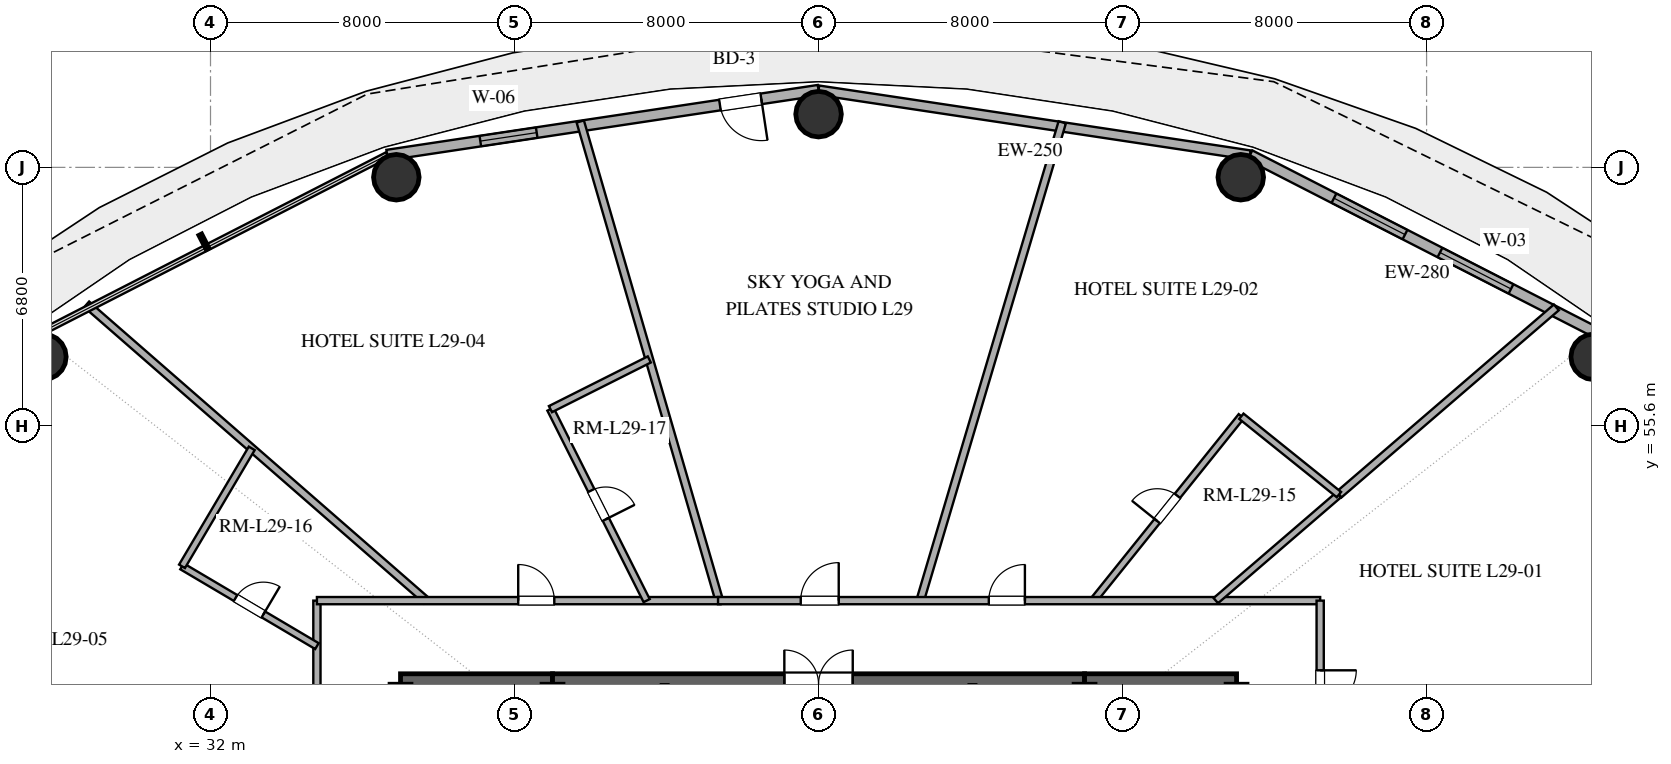
"""IFC4 building model, lengths in metres.
Left out: names, types, materials, properties, quantities, classifications, styles, units other than length and angle.
Written with IfcOpenShell. Run it as: python <this file> out.ifc"""

import sys

from ifc_helpers import new_model, si_unit, direction, frame, frame_2d, origin, origin_2d, place, context, subcontext, project, spatial, rectangle, hollow_circle, extrude, element, fill, save


model = new_model("IFC4")
c1 = context("Model", 3, precision=1e-05, world=origin(), true_north=direction((0.0, 1.0)))
c2 = subcontext(c1, "Body", "Model", "MODEL_VIEW")
j1 = project(units=[si_unit("LENGTHUNIT", "METRE"), si_unit("PLANEANGLEUNIT", "RADIAN")], contexts=[c1])
p1 = place(None, origin())
s1 = spatial("IfcSite", under=j1, at=p1, CompositionType="ELEMENT")
p2 = place(p1, origin())
s2 = spatial("IfcBuilding", under=s1, at=p2, CompositionType="ELEMENT")
p3 = place(p2, frame((0.0, 0.0, 116.4)))
s3 = spatial("IfcBuildingStorey", under=s2, at=p3, CompositionType="ELEMENT", Elevation=116.4)
p4 = place(p3, frame((37.0, 48.8, 0.0), z_axis=(0.0, 0.0, 1.0), x_axis=(1.0, 0.0, 0.0)))
e1 = element("IfcWall", 1, at=p4, inside=s3, PredefinedType="SHEAR", context=c2, shape_type="SweptSolid", body=[
    extrude(rectangle(XDim=4.0, YDim=0.55, at=frame_2d((2.0, 0.0))), origin(), (0.0, 0.0, 1.0), 3.38),
])
p5 = place(p3, frame((41.0, 48.8, 0.0), z_axis=(0.0, 0.0, 1.0), x_axis=(1.0, 0.0, 0.0)))
e2 = element("IfcWall", 2, at=p5, inside=s3, PredefinedType="SHEAR", context=c2, shape_type="SweptSolid", body=[
    extrude(rectangle(XDim=14.0, YDim=0.55, at=frame_2d((7.0, 0.0))), origin(), (0.0, 0.0, 1.0), 3.38),
])
p6 = place(p5, frame((6.1, 0.0, 0.0)))
e3 = element("IfcOpeningElement", 3, at=p6, cuts=e2, PredefinedType="OPENING", context=c2, shape_type="SweptSolid", body=[
    extrude(rectangle(XDim=1.8, YDim=2.25, at=frame_2d((0.9, 1.125))), frame((0.0, 0.285, 0.0), z_axis=(0.0, -1.0, 0.0), x_axis=(1.0, 0.0, 0.0)), (0.0, 0.0, 1.0), 0.57),
])
p7 = place(p3, frame((55.0, 48.8, 0.0), z_axis=(0.0, 0.0, 1.0), x_axis=(1.0, 0.0, 0.0)))
e4 = element("IfcWall", 4, at=p7, inside=s3, PredefinedType="SHEAR", context=c2, shape_type="SweptSolid", body=[
    extrude(rectangle(XDim=4.0, YDim=0.55, at=frame_2d((2.0, 0.0))), origin(), (0.0, 0.0, 1.0), 3.38),
])
for number, where, z_axis, x_axis in (
    (5, (68.398, 57.415, 0.0), (0.0, 0.0, 1.0), (1.0, 0.0, 0.0)),
    (6, (59.11, 62.141, 0.0), (0.0, 0.0, 1.0), (1.0, 0.0, 0.0)),
    (7, (48.0, 63.8, 0.0), (0.0, 0.0, 1.0), (1.0, 0.0, 0.0)),
    (8, (36.89, 62.141, 0.0), (0.0, 0.0, 1.0), (1.0, 0.0, 0.0)),
    (9, (27.602, 57.415, 0.0), (0.0, 0.0, 1.0), (1.0, 0.0, 0.0)),
):
    element("IfcColumn", number, at=place(p3, frame(where, z_axis=z_axis, x_axis=x_axis)), inside=s3, PredefinedType="COLUMN", context=c2, shape_type="SweptSolid", body=[
        extrude(hollow_circle(Radius=0.6, WallThickness=0.032, at=origin_2d()), origin(), (0.0, 0.0, 1.0), 3.38),
    ])
p8 = place(p3, frame((68.84, 57.86, 0.0), z_axis=(0.0, 0.0, 1.0), x_axis=(-0.889959505023, 0.45603955905, 0.0)))
e10 = element("IfcWall", 10, at=p8, inside=s3, PredefinedType="SOLIDWALL", context=c2, shape_type="SweptSolid", body=[
    extrude(rectangle(XDim=10.662, YDim=0.28, at=frame_2d((5.331, 0.0))), origin(), (0.0, 0.0, 1.0), 3.38),
])
p9 = place(p8, frame((2.942, 0.0, 0.85)))
e11 = element("IfcOpeningElement", 11, at=p9, cuts=e10, PredefinedType="OPENING", context=c2, shape_type="SweptSolid", body=[
    extrude(rectangle(XDim=2.1, YDim=2.2, at=frame_2d((1.05, 1.1))), frame((0.0, 0.15, 0.0), z_axis=(0.0, -1.0, 0.0), x_axis=(1.0, 0.0, 0.0)), (0.0, 0.0, 1.0), 0.3),
])
p10 = place(p8, frame((6.077, 0.0, 0.85)))
e12 = element("IfcOpeningElement", 12, at=p10, cuts=e10, PredefinedType="OPENING", context=c2, shape_type="SweptSolid", body=[
    extrude(rectangle(XDim=2.1, YDim=2.2, at=frame_2d((1.05, 1.1))), frame((0.0, 0.15, 0.0), z_axis=(0.0, -1.0, 0.0), x_axis=(1.0, 0.0, 0.0)), (0.0, 0.0, 1.0), 0.3),
])
p11 = place(p3, frame((59.351, 62.723, 0.0), z_axis=(0.0, 0.0, 1.0), x_axis=(-0.988877774656, 0.148730450117, 0.0)))
e13 = element("IfcWall", 13, at=p11, inside=s3, PredefinedType="SOLIDWALL", context=c2, shape_type="SweptSolid", body=[
    extrude(rectangle(XDim=11.479, YDim=0.25, at=frame_2d((5.74, 0.0))), origin(), (0.0, 0.0, 1.0), 3.38),
])
p12 = place(p3, frame((48.0, 64.43, 0.0), z_axis=(0.0, 0.0, 1.0), x_axis=(-0.988877774656, -0.148730450117, 0.0)))
e14 = element("IfcWall", 14, at=p12, inside=s3, PredefinedType="SOLIDWALL", context=c2, shape_type="SweptSolid", body=[
    extrude(rectangle(XDim=11.479, YDim=0.28, at=frame_2d((5.74, 0.0))), origin(), (0.0, 0.0, 1.0), 3.38),
])
p13 = place(p12, frame((1.524, 0.0, 0.0)))
e15 = element("IfcOpeningElement", 15, at=p13, cuts=e14, PredefinedType="OPENING", context=c2, shape_type="SweptSolid", body=[
    extrude(rectangle(XDim=1.1, YDim=2.25, at=frame_2d((0.55, 1.125))), frame((0.0, 0.15, 0.0), z_axis=(0.0, -1.0, 0.0), x_axis=(1.0, 0.0, 0.0)), (0.0, 0.0, 1.0), 0.3),
])
p14 = place(p12, frame((7.5, 0.0, 0.85)))
e16 = element("IfcOpeningElement", 16, at=p14, cuts=e14, PredefinedType="OPENING", context=c2, shape_type="SweptSolid", body=[
    extrude(rectangle(XDim=1.5, YDim=2.0, at=frame_2d((0.75, 1.0))), frame((0.0, 0.15, 0.0), z_axis=(0.0, -1.0, 0.0), x_axis=(1.0, 0.0, 0.0)), (0.0, 0.0, 1.0), 0.3),
])
p15 = place(p3, frame((54.413, 63.586, 0.0), z_axis=(0.0, 0.0, 1.0), x_axis=(-0.284782789849, -0.958592073098, 0.0)))
e17 = element("IfcWall", 17, at=p15, inside=s3, PredefinedType="PARTITIONING", context=c2, shape_type="SweptSolid", body=[
    extrude(rectangle(XDim=13.129, YDim=0.2, at=frame_2d((6.565, 0.0))), origin(), (0.0, 0.0, 1.0), 2.74),
])
p16 = place(p3, frame((67.415, 58.716, 0.0), z_axis=(0.0, 0.0, 1.0), x_axis=(-0.757805222449, -0.652480838668, 0.0)))
e18 = element("IfcWall", 18, at=p16, inside=s3, PredefinedType="PARTITIONING", context=c2, shape_type="SweptSolid", body=[
    extrude(rectangle(XDim=7.55, YDim=0.2, at=frame_2d((3.775, 0.0))), origin(), (0.0, 0.0, 1.0), 2.74),
])
p17 = place(p3, frame((45.388, 51.0, 0.0), z_axis=(0.0, 0.0, 1.0), x_axis=(-0.278690680179, 0.960380916502, 0.0)))
e19 = element("IfcWall", 19, at=p17, inside=s3, PredefinedType="PARTITIONING", context=c2, shape_type="SweptSolid", body=[
    extrude(rectangle(XDim=13.127, YDim=0.2, at=frame_2d((6.563, 0.0))), origin(), (0.0, 0.0, 1.0), 2.74),
])
p18 = place(p3, frame((55.229, 51.0, 0.0), z_axis=(0.0, 0.0, 1.0), x_axis=(0.626239129839, 0.779631035977, 0.0)))
e20 = element("IfcWall", 20, at=p18, inside=s3, PredefinedType="PLUMBINGWALL", context=c2, shape_type="SweptSolid", body=[
    extrude(rectangle(XDim=6.223, YDim=0.18, at=frame_2d((3.112, 0.0))), origin(), (0.0, 0.0, 1.0), 2.74),
])
p19 = place(p18, frame((2.687, 0.0, 0.0)))
e21 = element("IfcOpeningElement", 21, at=p19, cuts=e20, PredefinedType="OPENING", context=c2, shape_type="SweptSolid", body=[
    extrude(rectangle(XDim=0.85, YDim=2.1, at=frame_2d((0.425, 1.05))), frame((0.0, 0.1, 0.0), z_axis=(0.0, -1.0, 0.0), x_axis=(1.0, 0.0, 0.0)), (0.0, 0.0, 1.0), 0.2),
])
p20 = place(p3, frame((37.68, 51.0, 0.0), z_axis=(0.0, 0.0, 1.0), x_axis=(-0.753659518717, 0.657265037749, 0.0)))
e22 = element("IfcWall", 22, at=p20, inside=s3, PredefinedType="PARTITIONING", context=c2, shape_type="SweptSolid", body=[
    extrude(rectangle(XDim=11.861, YDim=0.2, at=frame_2d((5.93, 0.0))), origin(), (0.0, 0.0, 1.0), 2.74),
])
p21 = place(p3, frame((34.8, 41.476, 0.0), z_axis=(0.0, 0.0, 1.0), x_axis=(0.0, 1.0, 0.0)))
e23 = element("IfcWall", 23, at=p21, inside=s3, PredefinedType="PARTITIONING", context=c2, shape_type="SweptSolid", body=[
    extrude(rectangle(XDim=9.524, YDim=0.19, at=frame_2d((4.762, 0.0))), origin(), (0.0, 0.0, 1.0), 2.74),
])
p22 = place(p21, frame((4.924, 0.0, 0.0)))
e24 = element("IfcOpeningElement", 24, at=p22, cuts=e23, PredefinedType="OPENING", context=c2, shape_type="SweptSolid", body=[
    extrude(rectangle(XDim=0.95, YDim=2.15, at=frame_2d((0.475, 1.075))), frame((0.0, 0.105, 0.0), z_axis=(0.0, -1.0, 0.0), x_axis=(1.0, 0.0, 0.0)), (0.0, 0.0, 1.0), 0.21),
])
p23 = place(p3, frame((34.8, 51.0, 0.0), z_axis=(0.0, 0.0, 1.0), x_axis=(1.0, 0.0, 0.0)))
e25 = element("IfcWall", 25, at=p23, inside=s3, PredefinedType="PARTITIONING", context=c2, shape_type="SweptSolid", body=[
    extrude(rectangle(XDim=10.622, YDim=0.19, at=frame_2d((5.311, 0.0))), origin(), (0.0, 0.0, 1.0), 2.74),
])
p24 = place(p23, frame((5.297, 0.0, 0.0)))
e26 = element("IfcOpeningElement", 26, at=p24, cuts=e25, PredefinedType="OPENING", context=c2, shape_type="SweptSolid", body=[
    extrude(rectangle(XDim=0.95, YDim=2.15, at=frame_2d((0.475, 1.075))), frame((0.0, 0.105, 0.0), z_axis=(0.0, -1.0, 0.0), x_axis=(1.0, 0.0, 0.0)), (0.0, 0.0, 1.0), 0.21),
])
p25 = place(p3, frame((40.945, 56.039, 0.0), z_axis=(0.0, 0.0, 1.0), x_axis=(0.44904833135, -0.893507468414, 0.0)))
e27 = element("IfcWall", 27, at=p25, inside=s3, PredefinedType="PLUMBINGWALL", context=c2, shape_type="SweptSolid", body=[
    extrude(rectangle(XDim=5.639, YDim=0.18, at=frame_2d((2.82, 0.0))), origin(), (0.0, 0.0, 1.0), 2.74),
])
p26 = place(p25, frame((2.395, 0.0, 0.0)))
e28 = element("IfcOpeningElement", 28, at=p26, cuts=e27, PredefinedType="OPENING", context=c2, shape_type="SweptSolid", body=[
    extrude(rectangle(XDim=0.85, YDim=2.1, at=frame_2d((0.425, 1.05))), frame((0.0, 0.1, 0.0), z_axis=(0.0, -1.0, 0.0), x_axis=(1.0, 0.0, 0.0)), (0.0, 0.0, 1.0), 0.2),
])
p27 = place(p3, frame((45.355, 51.0, 0.0), z_axis=(0.0, 0.0, 1.0), x_axis=(1.0, 0.0, 0.0)))
e29 = element("IfcWall", 29, at=p27, inside=s3, PredefinedType="PARTITIONING", context=c2, shape_type="SweptSolid", body=[
    extrude(rectangle(XDim=15.845, YDim=0.19, at=frame_2d((7.922, 0.0))), origin(), (0.0, 0.0, 1.0), 2.74),
])
p28 = place(p27, frame((2.176, 0.0, 0.0)))
e30 = element("IfcOpeningElement", 30, at=p28, cuts=e29, PredefinedType="OPENING", context=c2, shape_type="SweptSolid", body=[
    extrude(rectangle(XDim=1.0, YDim=2.2, at=frame_2d((0.5, 1.1))), frame((0.0, 0.105, 0.0), z_axis=(0.0, -1.0, 0.0), x_axis=(1.0, 0.0, 0.0)), (0.0, 0.0, 1.0), 0.21),
])
p29 = place(p27, frame((7.125, 0.0, 0.0)))
e31 = element("IfcOpeningElement", 31, at=p29, cuts=e29, PredefinedType="OPENING", context=c2, shape_type="SweptSolid", body=[
    extrude(rectangle(XDim=0.95, YDim=2.15, at=frame_2d((0.475, 1.075))), frame((0.0, 0.105, 0.0), z_axis=(0.0, -1.0, 0.0), x_axis=(1.0, 0.0, 0.0)), (0.0, 0.0, 1.0), 0.21),
])
p30 = place(p3, frame((61.2, 51.0, 0.0), z_axis=(0.0, 0.0, 1.0), x_axis=(0.0, -1.0, 0.0)))
e32 = element("IfcWall", 32, at=p30, inside=s3, PredefinedType="PARTITIONING", context=c2, shape_type="SweptSolid", body=[
    extrude(rectangle(XDim=4.617, YDim=0.19, at=frame_2d((2.309, 0.0))), origin(), (0.0, 0.0, 1.0), 2.74),
])
p31 = place(p30, frame((1.833, 0.0, 0.0)))
e33 = element("IfcOpeningElement", 33, at=p31, cuts=e32, PredefinedType="OPENING", context=c2, shape_type="SweptSolid", body=[
    extrude(rectangle(XDim=0.95, YDim=2.15, at=frame_2d((0.475, 1.075))), frame((0.0, 0.105, 0.0), z_axis=(0.0, -1.0, 0.0), x_axis=(1.0, 0.0, 0.0)), (0.0, 0.0, 1.0), 0.21),
])
p32 = place(p3, frame((61.694, 53.79, 0.0), z_axis=(0.0, 0.0, 1.0), x_axis=(-0.757844088621, -0.652435695945, 0.0)))
e34 = element("IfcWall", 34, at=p32, inside=s3, PredefinedType="PLUMBINGWALL", context=c2, shape_type="SweptSolid", body=[
    extrude(rectangle(XDim=4.276, YDim=0.18, at=frame_2d((2.138, 0.0))), origin(), (0.0, 0.0, 1.0), 2.74),
])
p33 = place(p3, frame((31.25, 51.902, 0.0), z_axis=(0.0, 0.0, 1.0), x_axis=(0.860833406846, -0.508886869214, 0.0)))
e35 = element("IfcWall", 35, at=p33, inside=s3, PredefinedType="PLUMBINGWALL", context=c2, shape_type="SweptSolid", body=[
    extrude(rectangle(XDim=4.124, YDim=0.18, at=frame_2d((2.062, 0.0))), origin(), (0.0, 0.0, 1.0), 2.74),
])
p34 = place(p33, frame((1.637, 0.0, 0.0)))
e36 = element("IfcOpeningElement", 36, at=p34, cuts=e35, PredefinedType="OPENING", context=c2, shape_type="SweptSolid", body=[
    extrude(rectangle(XDim=0.85, YDim=2.1, at=frame_2d((0.425, 1.05))), frame((0.0, 0.1, 0.0), z_axis=(0.0, -1.0, 0.0), x_axis=(1.0, 0.0, 0.0)), (0.0, 0.0, 1.0), 0.2),
])
p35 = place(p3, frame((33.085, 55.007, 0.0), z_axis=(0.0, 0.0, 1.0), x_axis=(-0.508909491775, -0.860820032981, 0.0)))
e37 = element("IfcWall", 37, at=p35, inside=s3, PredefinedType="PLUMBINGWALL", context=c2, shape_type="SweptSolid", body=[
    extrude(rectangle(XDim=3.606, YDim=0.18, at=frame_2d((1.803, 0.0))), origin(), (0.0, 0.0, 1.0), 2.74),
])
p36 = place(p3, frame((59.126, 55.852, 0.0), z_axis=(0.0, 0.0, 1.0), x_axis=(0.779630447666, -0.626239862251, 0.0)))
e38 = element("IfcWall", 38, at=p36, inside=s3, PredefinedType="PLUMBINGWALL", context=c2, shape_type="SweptSolid", body=[
    extrude(rectangle(XDim=3.293, YDim=0.18, at=frame_2d((1.646, 0.0))), origin(), (0.0, 0.0, 1.0), 2.74),
])
p37 = place(p3, frame((43.547, 57.346, 0.0), z_axis=(0.0, 0.0, 1.0), x_axis=(-0.893519933294, -0.449023528122, 0.0)))
e39 = element("IfcWall", 39, at=p37, inside=s3, PredefinedType="PLUMBINGWALL", context=c2, shape_type="SweptSolid", body=[
    extrude(rectangle(XDim=2.912, YDim=0.18, at=frame_2d((1.456, 0.0))), origin(), (0.0, 0.0, 1.0), 2.74),
])
p38 = place(p9, origin())
e40 = element("IfcWindow", 40, at=p38, inside=s3, PartitioningType="SINGLE_PANEL", PredefinedType="WINDOW", context=c2, shape_type="SweptSolid", body=[
    extrude(rectangle(XDim=2.1, YDim=2.2, at=frame_2d((1.05, 1.1))), frame((0.0, 0.03, 0.0), z_axis=(0.0, -1.0, 0.0), x_axis=(1.0, 0.0, 0.0)), (0.0, 0.0, 1.0), 0.06),
])
fill(e11, e40)
p39 = place(p10, origin())
e41 = element("IfcWindow", 41, at=p39, inside=s3, PartitioningType="SINGLE_PANEL", PredefinedType="WINDOW", context=c2, shape_type="SweptSolid", body=[
    extrude(rectangle(XDim=2.1, YDim=2.2, at=frame_2d((1.05, 1.1))), frame((0.0, 0.03, 0.0), z_axis=(0.0, -1.0, 0.0), x_axis=(1.0, 0.0, 0.0)), (0.0, 0.0, 1.0), 0.06),
])
fill(e12, e41)
p40 = place(p13, origin())
e42 = element("IfcDoor", 42, at=p40, inside=s3, OperationType="SINGLE_SWING_LEFT", PredefinedType="DOOR", context=c2, shape_type="SweptSolid", body=[
    extrude(rectangle(XDim=1.1, YDim=2.25, at=frame_2d((0.55, 1.125))), frame((0.0, 0.025, 0.0), z_axis=(0.0, -1.0, 0.0), x_axis=(1.0, 0.0, 0.0)), (0.0, 0.0, 1.0), 0.05),
])
fill(e15, e42)
p41 = place(p14, origin())
e43 = element("IfcWindow", 43, at=p41, inside=s3, PartitioningType="SINGLE_PANEL", PredefinedType="WINDOW", context=c2, shape_type="SweptSolid", body=[
    extrude(rectangle(XDim=1.5, YDim=2.0, at=frame_2d((0.75, 1.0))), frame((0.0, 0.03, 0.0), z_axis=(0.0, -1.0, 0.0), x_axis=(1.0, 0.0, 0.0)), (0.0, 0.0, 1.0), 0.06),
])
fill(e16, e43)
p42 = place(p6, origin())
e44 = element("IfcDoor", 44, at=p42, inside=s3, OperationType="DOUBLE_DOOR_SINGLE_SWING", PredefinedType="DOOR", context=c2, shape_type="SweptSolid", body=[
    extrude(rectangle(XDim=1.8, YDim=2.25, at=frame_2d((0.9, 1.125))), frame((0.0, 0.025, 0.0), z_axis=(0.0, -1.0, 0.0), x_axis=(1.0, 0.0, 0.0)), (0.0, 0.0, 1.0), 0.05),
])
fill(e3, e44)
p43 = place(p19, origin())
e45 = element("IfcDoor", 45, at=p43, inside=s3, OperationType="SINGLE_SWING_LEFT", PredefinedType="DOOR", context=c2, shape_type="SweptSolid", body=[
    extrude(rectangle(XDim=0.85, YDim=2.1, at=frame_2d((0.425, 1.05))), frame((0.0, 0.025, 0.0), z_axis=(0.0, -1.0, 0.0), x_axis=(1.0, 0.0, 0.0)), (0.0, 0.0, 1.0), 0.05),
])
fill(e21, e45)
p44 = place(p24, origin())
e46 = element("IfcDoor", 46, at=p44, inside=s3, OperationType="SINGLE_SWING_LEFT", PredefinedType="DOOR", context=c2, shape_type="SweptSolid", body=[
    extrude(rectangle(XDim=0.95, YDim=2.15, at=frame_2d((0.475, 1.075))), frame((0.0, 0.025, 0.0), z_axis=(0.0, -1.0, 0.0), x_axis=(1.0, 0.0, 0.0)), (0.0, 0.0, 1.0), 0.05),
])
fill(e26, e46)
p45 = place(p26, origin())
e47 = element("IfcDoor", 47, at=p45, inside=s3, OperationType="SINGLE_SWING_RIGHT", PredefinedType="DOOR", context=c2, shape_type="SweptSolid", body=[
    extrude(rectangle(XDim=0.85, YDim=2.1, at=frame_2d((0.425, 1.05))), frame((0.0, 0.025, 0.0), z_axis=(0.0, -1.0, 0.0), x_axis=(1.0, 0.0, 0.0)), (0.0, 0.0, 1.0), 0.05),
])
fill(e28, e47)
p46 = place(p28, origin())
e48 = element("IfcDoor", 48, at=p46, inside=s3, OperationType="SINGLE_SWING_RIGHT", PredefinedType="DOOR", context=c2, shape_type="SweptSolid", body=[
    extrude(rectangle(XDim=1.0, YDim=2.2, at=frame_2d((0.5, 1.1))), frame((0.0, 0.025, 0.0), z_axis=(0.0, -1.0, 0.0), x_axis=(1.0, 0.0, 0.0)), (0.0, 0.0, 1.0), 0.05),
])
fill(e30, e48)
p47 = place(p29, origin())
e49 = element("IfcDoor", 49, at=p47, inside=s3, OperationType="SINGLE_SWING_RIGHT", PredefinedType="DOOR", context=c2, shape_type="SweptSolid", body=[
    extrude(rectangle(XDim=0.95, YDim=2.15, at=frame_2d((0.475, 1.075))), frame((0.0, 0.025, 0.0), z_axis=(0.0, -1.0, 0.0), x_axis=(1.0, 0.0, 0.0)), (0.0, 0.0, 1.0), 0.05),
])
fill(e31, e49)
p48 = place(p31, origin())
e50 = element("IfcDoor", 50, at=p48, inside=s3, OperationType="SINGLE_SWING_LEFT", PredefinedType="DOOR", context=c2, shape_type="SweptSolid", body=[
    extrude(rectangle(XDim=0.95, YDim=2.15, at=frame_2d((0.475, 1.075))), frame((0.0, 0.025, 0.0), z_axis=(0.0, -1.0, 0.0), x_axis=(1.0, 0.0, 0.0)), (0.0, 0.0, 1.0), 0.05),
])
fill(e33, e50)
p49 = place(p34, origin())
e51 = element("IfcDoor", 51, at=p49, inside=s3, OperationType="SINGLE_SWING_RIGHT", PredefinedType="DOOR", context=c2, shape_type="SweptSolid", body=[
    extrude(rectangle(XDim=0.85, YDim=2.1, at=frame_2d((0.425, 1.05))), frame((0.0, 0.025, 0.0), z_axis=(0.0, -1.0, 0.0), x_axis=(1.0, 0.0, 0.0)), (0.0, 0.0, 1.0), 0.05),
])
fill(e36, e51)
save(model, sys.argv[1])
